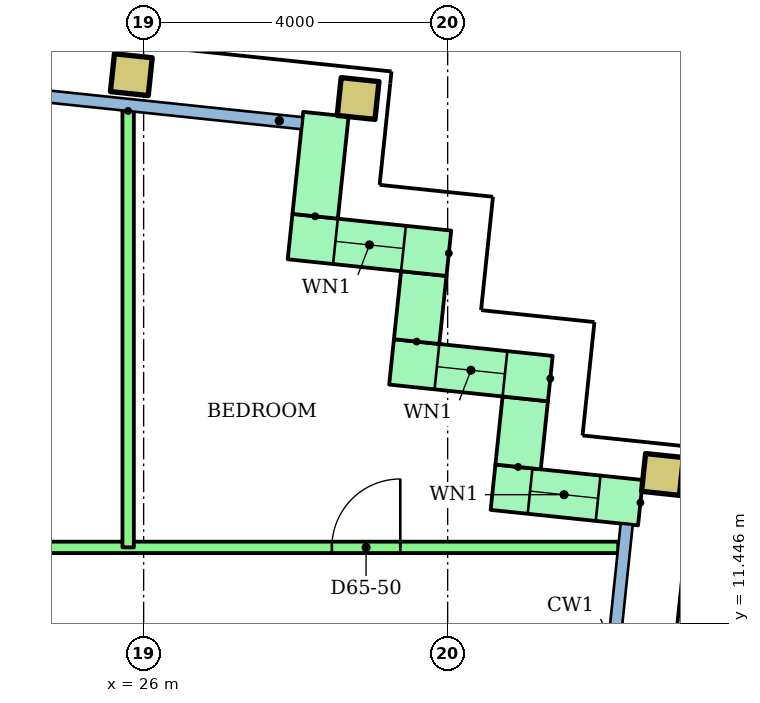
"""IFC4 building model, lengths in metres.
Left out: names, types, materials, properties, quantities, classifications, styles, units other than length and angle.
Written with IfcOpenShell. Run it as: python <this file> out.ifc"""

import sys

from ifc_helpers import new_model, si_unit, direction, frame, frame_2d, origin, origin_2d, place, context, subcontext, project, spatial, rectangle, hollow_rectangle, extrude, element, fill, save


model = new_model("IFC4")
c1 = context("Model", 3, precision=1e-05, world=origin(), true_north=direction((0.0, 1.0)))
c2 = subcontext(c1, "Body", "Model", "MODEL_VIEW")
j1 = project(units=[si_unit("LENGTHUNIT", "METRE"), si_unit("PLANEANGLEUNIT", "RADIAN")], contexts=[c1])
p1 = place(None, origin())
s1 = spatial("IfcSite", under=j1, at=p1, CompositionType="ELEMENT")
p2 = place(p1, origin())
s2 = spatial("IfcBuilding", under=s1, at=p2, CompositionType="ELEMENT")
p3 = place(p2, frame((0.0, 0.0, 253.1)))
s3 = spatial("IfcBuildingStorey", under=s2, at=p3, CompositionType="ELEMENT", Elevation=253.1)
for number, where, z_axis, x_axis in (
    (1, (32.827, 13.403, 0.0), (0.0, 0.0, 1.0), (0.995, -0.105, 0.0)),
    (2, (25.838, 18.662, 0.0), (0.0, 0.0, 1.0), (0.995, -0.105, 0.0)),
    (3, (28.822, 18.349, 0.0), (0.0, 0.0, 1.0), (0.995, -0.105, 0.0)),
):
    element("IfcColumn", number, at=place(p3, frame(where, z_axis=z_axis, x_axis=x_axis)), inside=s3, PredefinedType="COLUMN", context=c2, shape_type="SweptSolid", body=[
        extrude(hollow_rectangle(XDim=0.5, YDim=0.5, WallThickness=0.025, at=origin_2d()), origin(), (0.0, 0.0, 1.0), 3.2),
    ])
p4 = place(p3, frame((32.536, 13.031, 0.0), z_axis=(0.0, 0.0, 1.0), x_axis=(-0.994534226826, 0.104411070641, 0.0)))
e4 = element("IfcWall", 4, at=p4, inside=s3, PredefinedType="STANDARD", context=c2, shape_type="SweptSolid", body=[
    extrude(rectangle(XDim=1.95, YDim=0.6, at=frame_2d((0.975, 0.0))), origin(), (0.0, 0.0, 1.0), 2.92),
])
p5 = place(p4, frame((0.56, 0.0, 0.9)))
e5 = element("IfcOpeningElement", 5, at=p5, cuts=e4, PredefinedType="OPENING", context=c2, shape_type="SweptSolid", body=[
    extrude(rectangle(XDim=0.9, YDim=1.5, at=frame_2d((0.45, 0.75))), frame((0.0, 0.31, 0.0), z_axis=(0.0, -1.0, 0.0), x_axis=(1.0, 0.0, 0.0)), (0.0, 0.0, 1.0), 0.62),
])
p6 = place(p3, frame((30.927, 13.502, 0.0), z_axis=(0.0, 0.0, 1.0), x_axis=(0.104416541099, 0.994533652495, 0.0)))
e6 = element("IfcWall", 6, at=p6, inside=s3, PredefinedType="STANDARD", context=c2, shape_type="SweptSolid", body=[
    extrude(rectangle(XDim=0.9, YDim=0.6, at=frame_2d((0.45, 0.0))), origin(), (0.0, 0.0, 1.0), 2.92),
])
p7 = place(p3, frame((31.351, 14.664, 0.0), z_axis=(0.0, 0.0, 1.0), x_axis=(-0.994523910136, 0.104509292252, 0.0)))
e7 = element("IfcWall", 7, at=p7, inside=s3, PredefinedType="STANDARD", context=c2, shape_type="SweptSolid", body=[
    extrude(rectangle(XDim=2.1, YDim=0.6, at=frame_2d((1.05, 0.0))), origin(), (0.0, 0.0, 1.0), 2.92),
])
p8 = place(p7, frame((0.6, 0.0, 0.9)))
e8 = element("IfcOpeningElement", 8, at=p8, cuts=e7, PredefinedType="OPENING", context=c2, shape_type="SweptSolid", body=[
    extrude(rectangle(XDim=0.9, YDim=1.5, at=frame_2d((0.45, 0.75))), frame((0.0, 0.31, 0.0), z_axis=(0.0, -1.0, 0.0), x_axis=(1.0, 0.0, 0.0)), (0.0, 0.0, 1.0), 0.62),
])
p9 = place(p3, frame((29.592, 15.151, 0.0), z_axis=(0.0, 0.0, 1.0), x_axis=(0.104444712852, 0.994530694326, 0.0)))
e9 = element("IfcWall", 9, at=p9, inside=s3, PredefinedType="STANDARD", context=c2, shape_type="SweptSolid", body=[
    extrude(rectangle(XDim=0.9, YDim=0.6, at=frame_2d((0.45, 0.0))), origin(), (0.0, 0.0, 1.0), 2.92),
])
p10 = place(p3, frame((30.015, 16.312, 0.0), z_axis=(0.0, 0.0, 1.0), x_axis=(-0.994510548187, 0.104636368175, 0.0)))
e10 = element("IfcWall", 10, at=p10, inside=s3, PredefinedType="STANDARD", context=c2, shape_type="SweptSolid", body=[
    extrude(rectangle(XDim=2.1, YDim=0.6, at=frame_2d((1.05, 0.0))), origin(), (0.0, 0.0, 1.0), 2.92),
])
p11 = place(p10, frame((0.6, 0.0, 0.9)))
e11 = element("IfcOpeningElement", 11, at=p11, cuts=e10, PredefinedType="OPENING", context=c2, shape_type="SweptSolid", body=[
    extrude(rectangle(XDim=0.9, YDim=1.5, at=frame_2d((0.45, 0.75))), frame((0.0, 0.31, 0.0), z_axis=(0.0, -1.0, 0.0), x_axis=(1.0, 0.0, 0.0)), (0.0, 0.0, 1.0), 0.62),
])
p12 = place(p3, frame((28.257, 16.799, 0.0), z_axis=(0.0, 0.0, 1.0), x_axis=(0.104534153452, 0.994521297289, 0.0)))
e12 = element("IfcWall", 12, at=p12, inside=s3, PredefinedType="STANDARD", context=c2, shape_type="SweptSolid", body=[
    extrude(rectangle(XDim=1.35, YDim=0.6, at=frame_2d((0.675, 0.0))), origin(), (0.0, 0.0, 1.0), 2.92),
])
p13 = place(p3, frame((10.0, 12.443, 0.0)))
e13 = element("IfcWall", 13, at=p13, inside=s3, PredefinedType="PARTITIONING", context=c2, shape_type="SweptSolid", body=[
    extrude(rectangle(XDim=22.244, YDim=0.15, at=frame_2d((11.122, 0.0))), origin(), (0.0, 0.0, 1.0), 2.4),
])
p14 = place(p13, frame((3.47, 0.0, 0.0)))
e14 = element("IfcOpeningElement", 14, at=p14, cuts=e13, PredefinedType="OPENING", context=c2, shape_type="SweptSolid", body=[
    extrude(rectangle(XDim=0.9, YDim=2.1, at=frame_2d((0.45, 1.05))), frame((0.0, 0.085, 0.0), z_axis=(0.0, -1.0, 0.0), x_axis=(1.0, 0.0, 0.0)), (0.0, 0.0, 1.0), 0.17),
])
p15 = place(p13, frame((11.318, 0.0, 0.0)))
e15 = element("IfcOpeningElement", 15, at=p15, cuts=e13, PredefinedType="OPENING", context=c2, shape_type="SweptSolid", body=[
    extrude(rectangle(XDim=1.0, YDim=2.1, at=frame_2d((0.5, 1.05))), frame((0.0, 0.085, 0.0), z_axis=(0.0, -1.0, 0.0), x_axis=(1.0, 0.0, 0.0)), (0.0, 0.0, 1.0), 0.17),
])
p16 = place(p13, frame((18.477, 0.0, 0.0)))
e16 = element("IfcOpeningElement", 16, at=p16, cuts=e13, PredefinedType="OPENING", context=c2, shape_type="SweptSolid", body=[
    extrude(rectangle(XDim=0.9, YDim=2.1, at=frame_2d((0.45, 1.05))), frame((0.0, 0.085, 0.0), z_axis=(0.0, -1.0, 0.0), x_axis=(1.0, 0.0, 0.0)), (0.0, 0.0, 1.0), 0.17),
])
p17 = place(p3, frame((25.796, 18.185, 0.0), z_axis=(0.0, 0.0, 1.0), x_axis=(0.0, -1.0, 0.0)))
e17 = element("IfcWall", 17, at=p17, inside=s3, PredefinedType="PARTITIONING", context=c2, shape_type="SweptSolid", body=[
    extrude(rectangle(XDim=5.741, YDim=0.15, at=frame_2d((2.871, 0.0))), origin(), (0.0, 0.0, 1.0), 2.4),
])
p18 = place(p5, origin())
e18 = element("IfcWindow", 18, at=p18, inside=s3, PartitioningType="SINGLE_PANEL", PredefinedType="WINDOW", context=c2, shape_type="SweptSolid", body=[
    extrude(rectangle(XDim=0.9, YDim=1.5, at=frame_2d((0.45, 0.75))), frame((0.0, 0.03, 0.0), z_axis=(0.0, -1.0, 0.0), x_axis=(1.0, 0.0, 0.0)), (0.0, 0.0, 1.0), 0.06),
])
fill(e5, e18)
p19 = place(p8, origin())
e19 = element("IfcWindow", 19, at=p19, inside=s3, PartitioningType="SINGLE_PANEL", PredefinedType="WINDOW", context=c2, shape_type="SweptSolid", body=[
    extrude(rectangle(XDim=0.9, YDim=1.5, at=frame_2d((0.45, 0.75))), frame((0.0, 0.03, 0.0), z_axis=(0.0, -1.0, 0.0), x_axis=(1.0, 0.0, 0.0)), (0.0, 0.0, 1.0), 0.06),
])
fill(e8, e19)
p20 = place(p11, origin())
e20 = element("IfcWindow", 20, at=p20, inside=s3, PartitioningType="SINGLE_PANEL", PredefinedType="WINDOW", context=c2, shape_type="SweptSolid", body=[
    extrude(rectangle(XDim=0.9, YDim=1.5, at=frame_2d((0.45, 0.75))), frame((0.0, 0.03, 0.0), z_axis=(0.0, -1.0, 0.0), x_axis=(1.0, 0.0, 0.0)), (0.0, 0.0, 1.0), 0.06),
])
fill(e11, e20)
p21 = place(p16, origin())
e21 = element("IfcDoor", 21, at=p21, inside=s3, OperationType="SINGLE_SWING_RIGHT", PredefinedType="DOOR", context=c2, shape_type="SweptSolid", body=[
    extrude(rectangle(XDim=0.9, YDim=2.1, at=frame_2d((0.45, 1.05))), frame((0.0, 0.025, 0.0), z_axis=(0.0, -1.0, 0.0), x_axis=(1.0, 0.0, 0.0)), (0.0, 0.0, 1.0), 0.05),
])
fill(e16, e21)
save(model, sys.argv[1])
